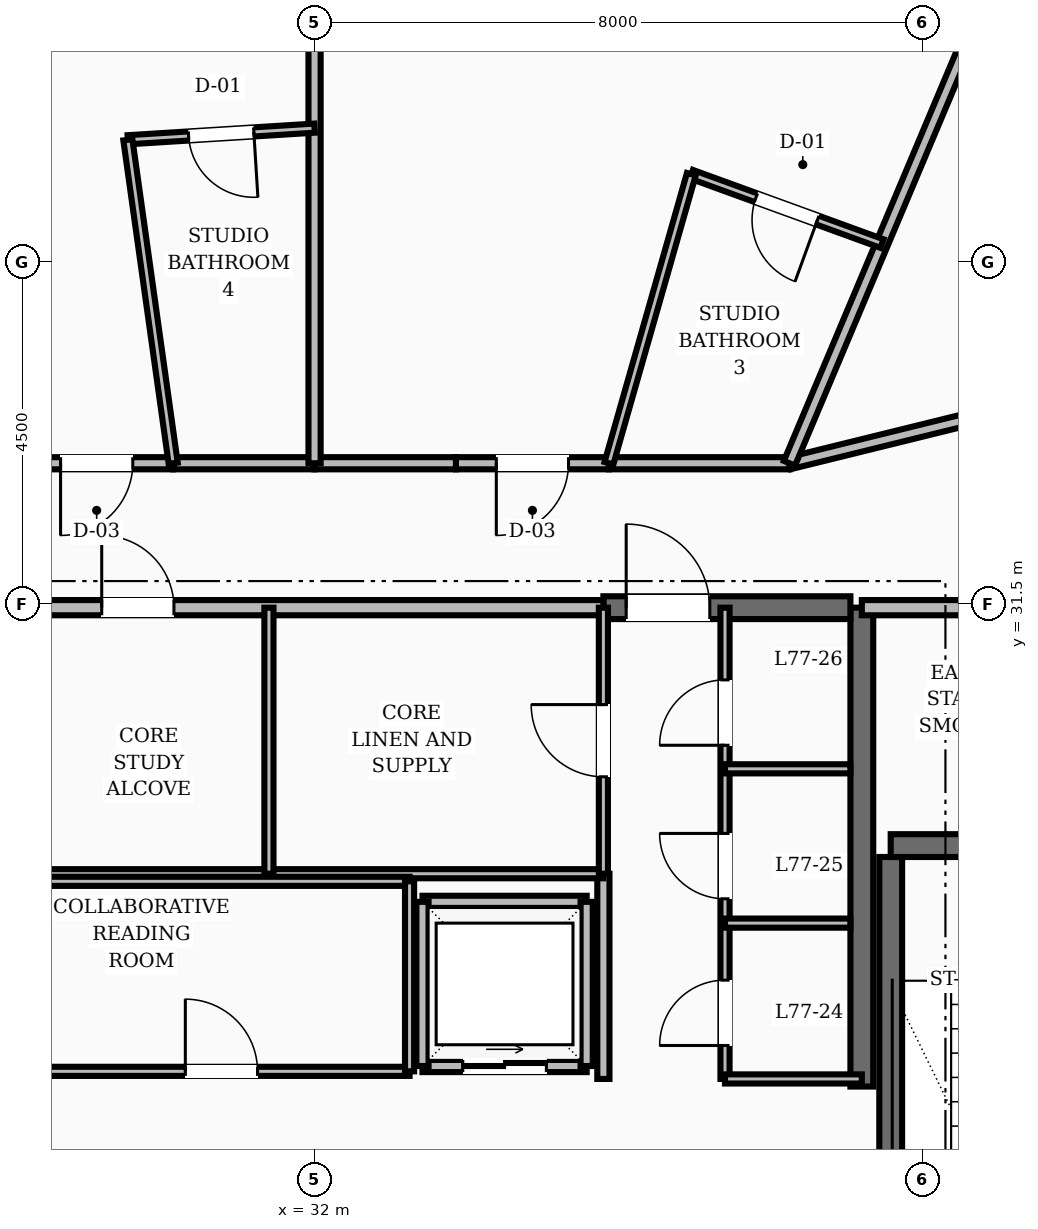
"""IFC4 building model, lengths in metres.
Left out: names, types, materials, properties, quantities, classifications, styles, units other than length and angle.
Written with IfcOpenShell. Run it as: python <this file> out.ifc"""

import sys

from ifc_helpers import new_model, si_unit, direction, frame, frame_2d, origin, place, context, subcontext, project, spatial, rectangle, extrude, element, fill, save


model = new_model("IFC4")
c1 = context("Model", 3, precision=1e-05, world=origin(), true_north=direction((0.0, 1.0)))
c2 = subcontext(c1, "Body", "Model", "MODEL_VIEW")
j1 = project(units=[si_unit("LENGTHUNIT", "METRE"), si_unit("PLANEANGLEUNIT", "RADIAN")], contexts=[c1])
p1 = place(None, origin())
s1 = spatial("IfcSite", under=j1, at=p1, CompositionType="ELEMENT")
p2 = place(p1, origin())
s2 = spatial("IfcBuilding", under=s1, at=p2, CompositionType="ELEMENT")
p3 = place(p2, frame((0.0, 0.0, 294.0)))
s3 = spatial("IfcBuildingStorey", under=s2, at=p3, CompositionType="ELEMENT", Elevation=294.0)
p4 = place(p3, frame((39.2, 25.15, 0.0), z_axis=(0.0, 0.0, 1.0), x_axis=(0.0, 1.0, 0.0)))
e1 = element("IfcWall", 1, at=p4, inside=s3, PredefinedType="SHEAR", context=c2, shape_type="SweptSolid", body=[
    extrude(rectangle(XDim=6.3, YDim=0.3, at=frame_2d((3.15, 0.0))), origin(), (0.0, 0.0, 1.0), 3.6),
])
p5 = place(p3, frame((35.8, 31.45, 0.0), z_axis=(0.0, 0.0, 1.0), x_axis=(1.0, 0.0, 0.0)))
e2 = element("IfcWall", 2, at=p5, inside=s3, PredefinedType="SHEAR", context=c2, shape_type="SweptSolid", body=[
    extrude(rectangle(XDim=3.25, YDim=0.3, at=frame_2d((1.625, 0.0))), origin(), (0.0, 0.0, 1.0), 3.6),
])
p6 = place(p5, frame((0.3, 0.0, 0.0)))
e3 = element("IfcOpeningElement", 3, at=p6, cuts=e2, PredefinedType="OPENING", context=c2, shape_type="SweptSolid", body=[
    extrude(rectangle(XDim=1.1, YDim=2.1, at=frame_2d((0.55, 1.05))), frame((0.0, 0.16, 0.0), z_axis=(0.0, -1.0, 0.0), x_axis=(1.0, 0.0, 0.0)), (0.0, 0.0, 1.0), 0.32),
])
p7 = place(p3, frame((39.58, 19.43, 0.0), z_axis=(0.0, 0.0, 1.0), x_axis=(0.0, 1.0, 0.0)))
e4 = element("IfcWall", 4, at=p7, inside=s3, PredefinedType="SHEAR", context=c2, shape_type="SweptSolid", body=[
    extrude(rectangle(XDim=8.74, YDim=0.3, at=frame_2d((4.37, 0.0))), origin(), (0.0, 0.0, 1.0), 3.6),
])
p8 = place(p3, frame((39.58, 28.32, 0.0), z_axis=(0.0, 0.0, 1.0), x_axis=(1.0, 0.0, 0.0)))
e5 = element("IfcWall", 5, at=p8, inside=s3, PredefinedType="SHEAR", context=c2, shape_type="SweptSolid", body=[
    extrude(rectangle(XDim=3.6, YDim=0.3, at=frame_2d((1.8, 0.0))), origin(), (0.0, 0.0, 1.0), 3.6),
])
p9 = place(p8, frame((1.3, 0.0, 0.0)))
e6 = element("IfcOpeningElement", 6, at=p9, cuts=e5, PredefinedType="OPENING", context=c2, shape_type="SweptSolid", body=[
    extrude(rectangle(XDim=1.1, YDim=2.1, at=frame_2d((0.55, 1.05))), frame((0.0, 0.16, 0.0), z_axis=(0.0, -1.0, 0.0), x_axis=(1.0, 0.0, 0.0)), (0.0, 0.0, 1.0), 0.32),
])
p10 = place(p3, frame((39.2, 31.45, 0.0), z_axis=(0.0, 0.0, 1.0), x_axis=(1.0, 0.0, 0.0)))
e7 = element("IfcWall", 7, at=p10, inside=s3, PredefinedType="SOLIDWALL", context=c2, shape_type="SweptSolid", body=[
    extrude(rectangle(XDim=3.98, YDim=0.2, at=frame_2d((1.99, 0.0))), origin(), (0.0, 0.0, 1.0), 2.81),
])
p11 = place(p3, frame((35.8, 25.25, 0.0), z_axis=(0.0, 0.0, 1.0), x_axis=(0.0, 1.0, 0.0)))
e8 = element("IfcWall", 8, at=p11, inside=s3, PredefinedType="SOLIDWALL", context=c2, shape_type="SweptSolid", body=[
    extrude(rectangle(XDim=2.7, YDim=0.16, at=frame_2d((1.35, 0.0))), origin(), (0.0, 0.0, 1.0), 2.81),
])
p12 = place(p3, frame((33.42, 25.42, 0.0), z_axis=(0.0, 0.0, 1.0), x_axis=(1.0, 0.0, 0.0)))
e9 = element("IfcWall", 9, at=p12, inside=s3, PredefinedType="SOLIDWALL", context=c2, shape_type="SweptSolid", body=[
    extrude(rectangle(XDim=2.16, YDim=0.16, at=frame_2d((1.08, 0.0))), origin(), (0.0, 0.0, 1.0), 2.81),
])
p13 = place(p12, frame((0.53, 0.0, 0.0)))
e10 = element("IfcOpeningElement", 10, at=p13, cuts=e9, PredefinedType="OPENING", context=c2, shape_type="SweptSolid", body=[
    extrude(rectangle(XDim=1.1, YDim=2.15, at=frame_2d((0.55, 1.075))), frame((0.0, 0.09, 0.0), z_axis=(0.0, -1.0, 0.0), x_axis=(1.0, 0.0, 0.0)), (0.0, 0.0, 1.0), 0.18),
])
for number, where, z_axis, x_axis in (
    (11, (33.42, 27.58, 0.0), (0.0, 0.0, 1.0), (1.0, 0.0, 0.0)),
    (12, (33.42, 25.42, 0.0), (0.0, 0.0, 1.0), (0.0, 1.0, 0.0)),
    (13, (35.58, 25.42, 0.0), (0.0, 0.0, 1.0), (0.0, 1.0, 0.0)),
):
    element("IfcWall", number, at=place(p3, frame(where, z_axis=z_axis, x_axis=x_axis)), inside=s3, PredefinedType="SOLIDWALL", context=c2, shape_type="SweptSolid", body=[
        extrude(rectangle(XDim=2.16, YDim=0.16, at=frame_2d((1.08, 0.0))), origin(), (0.0, 0.0, 1.0), 2.81),
    ])
p14 = place(p3, frame((28.2, 31.45, 0.0), z_axis=(0.0, 0.0, 1.0), x_axis=(1.0, 0.0, 0.0)))
e14 = element("IfcWall", 14, at=p14, inside=s3, PredefinedType="SOLIDWALL", context=c2, shape_type="SweptSolid", body=[
    extrude(rectangle(XDim=7.6, YDim=0.2, at=frame_2d((3.8, 0.0))), origin(), (0.0, 0.0, 1.0), 2.81),
])
p15 = place(p14, frame((1.0, 0.0, 0.0)))
e15 = element("IfcOpeningElement", 15, at=p15, cuts=e14, PredefinedType="OPENING", context=c2, shape_type="SweptSolid", body=[
    extrude(rectangle(XDim=0.95, YDim=2.1, at=frame_2d((0.475, 1.05))), frame((0.0, 0.11, 0.0), z_axis=(0.0, -1.0, 0.0), x_axis=(1.0, 0.0, 0.0)), (0.0, 0.0, 1.0), 0.22),
])
p16 = place(p3, frame((28.2, 27.95, 0.0), z_axis=(0.0, 0.0, 1.0), x_axis=(1.0, 0.0, 0.0)))
e16 = element("IfcWall", 16, at=p16, inside=s3, PredefinedType="PARTITIONING", context=c2, shape_type="SweptSolid", body=[
    extrude(rectangle(XDim=7.6, YDim=0.12, at=frame_2d((3.8, 0.0))), origin(), (0.0, 0.0, 1.0), 2.81),
])
p17 = place(p3, frame((35.8, 27.95, 0.0), z_axis=(0.0, 0.0, 1.0), x_axis=(0.0, 1.0, 0.0)))
e17 = element("IfcWall", 17, at=p17, inside=s3, PredefinedType="PARTITIONING", context=c2, shape_type="SweptSolid", body=[
    extrude(rectangle(XDim=3.5, YDim=0.12, at=frame_2d((1.75, 0.0))), origin(), (0.0, 0.0, 1.0), 2.81),
])
p18 = place(p17, frame((1.275, 0.0, 0.0)))
e18 = element("IfcOpeningElement", 18, at=p18, cuts=e17, PredefinedType="OPENING", context=c2, shape_type="SweptSolid", body=[
    extrude(rectangle(XDim=0.95, YDim=2.1, at=frame_2d((0.475, 1.05))), frame((0.0, 0.07, 0.0), z_axis=(0.0, -1.0, 0.0), x_axis=(1.0, 0.0, 0.0)), (0.0, 0.0, 1.0), 0.14),
])
p19 = place(p3, frame((31.4, 27.95, 0.0), z_axis=(0.0, 0.0, 1.0), x_axis=(0.0, 1.0, 0.0)))
e19 = element("IfcWall", 19, at=p19, inside=s3, PredefinedType="PARTITIONING", context=c2, shape_type="SweptSolid", body=[
    extrude(rectangle(XDim=3.5, YDim=0.12, at=frame_2d((1.75, 0.0))), origin(), (0.0, 0.0, 1.0), 2.81),
])
p20 = place(p3, frame((28.3, 25.35, 0.0), z_axis=(0.0, 0.0, 1.0), x_axis=(1.0, 0.0, 0.0)))
e20 = element("IfcWall", 20, at=p20, inside=s3, PredefinedType="PARTITIONING", context=c2, shape_type="SweptSolid", body=[
    extrude(rectangle(XDim=4.95, YDim=0.12, at=frame_2d((2.475, 0.0))), origin(), (0.0, 0.0, 1.0), 2.81),
])
p21 = place(p20, frame((2.0, 0.0, 0.0)))
e21 = element("IfcOpeningElement", 21, at=p21, cuts=e20, PredefinedType="OPENING", context=c2, shape_type="SweptSolid", body=[
    extrude(rectangle(XDim=0.95, YDim=2.1, at=frame_2d((0.475, 1.05))), frame((0.0, 0.07, 0.0), z_axis=(0.0, -1.0, 0.0), x_axis=(1.0, 0.0, 0.0)), (0.0, 0.0, 1.0), 0.14),
])
p22 = place(p3, frame((28.3, 27.85, 0.0), z_axis=(0.0, 0.0, 1.0), x_axis=(1.0, 0.0, 0.0)))
e22 = element("IfcWall", 22, at=p22, inside=s3, PredefinedType="PARTITIONING", context=c2, shape_type="SweptSolid", body=[
    extrude(rectangle(XDim=4.95, YDim=0.12, at=frame_2d((2.475, 0.0))), origin(), (0.0, 0.0, 1.0), 2.81),
])
p23 = place(p3, frame((33.25, 25.35, 0.0), z_axis=(0.0, 0.0, 1.0), x_axis=(0.0, 1.0, 0.0)))
e23 = element("IfcWall", 23, at=p23, inside=s3, PredefinedType="PARTITIONING", context=c2, shape_type="SweptSolid", body=[
    extrude(rectangle(XDim=2.5, YDim=0.12, at=frame_2d((1.25, 0.0))), origin(), (0.0, 0.0, 1.0), 2.81),
])
p24 = place(p3, frame((37.4, 25.25, 0.0), z_axis=(0.0, 0.0, 1.0), x_axis=(0.0, 1.0, 0.0)))
e24 = element("IfcWall", 24, at=p24, inside=s3, PredefinedType="PARTITIONING", context=c2, shape_type="SweptSolid", body=[
    extrude(rectangle(XDim=6.2, YDim=0.12, at=frame_2d((3.1, 0.0))), origin(), (0.0, 0.0, 1.0), 2.81),
])
p25 = place(p24, frame((0.44, 0.0, 0.0)))
e25 = element("IfcOpeningElement", 25, at=p25, cuts=e24, PredefinedType="OPENING", context=c2, shape_type="SweptSolid", body=[
    extrude(rectangle(XDim=0.86, YDim=2.1, at=frame_2d((0.43, 1.05))), frame((0.0, 0.07, 0.0), z_axis=(0.0, -1.0, 0.0), x_axis=(1.0, 0.0, 0.0)), (0.0, 0.0, 1.0), 0.14),
])
p26 = place(p24, frame((2.37, 0.0, 0.0)))
e26 = element("IfcOpeningElement", 26, at=p26, cuts=e24, PredefinedType="OPENING", context=c2, shape_type="SweptSolid", body=[
    extrude(rectangle(XDim=0.86, YDim=2.1, at=frame_2d((0.43, 1.05))), frame((0.0, 0.07, 0.0), z_axis=(0.0, -1.0, 0.0), x_axis=(1.0, 0.0, 0.0)), (0.0, 0.0, 1.0), 0.14),
])
p27 = place(p24, frame((4.39, 0.0, 0.0)))
e27 = element("IfcOpeningElement", 27, at=p27, cuts=e24, PredefinedType="OPENING", context=c2, shape_type="SweptSolid", body=[
    extrude(rectangle(XDim=0.86, YDim=2.1, at=frame_2d((0.43, 1.05))), frame((0.0, 0.07, 0.0), z_axis=(0.0, -1.0, 0.0), x_axis=(1.0, 0.0, 0.0)), (0.0, 0.0, 1.0), 0.14),
])
p28 = place(p3, frame((37.4, 25.25, 0.0), z_axis=(0.0, 0.0, 1.0), x_axis=(1.0, 0.0, 0.0)))
e28 = element("IfcWall", 28, at=p28, inside=s3, PredefinedType="PARTITIONING", context=c2, shape_type="SweptSolid", body=[
    extrude(rectangle(XDim=1.8, YDim=0.12, at=frame_2d((0.9, 0.0))), origin(), (0.0, 0.0, 1.0), 2.81),
])
for number, where, z_axis, x_axis in (
    (29, (37.4, 27.3, 0.0), (0.0, 0.0, 1.0), (1.0, 0.0, 0.0)),
    (30, (37.4, 29.33, 0.0), (0.0, 0.0, 1.0), (1.0, 0.0, 0.0)),
):
    element("IfcWall", number, at=place(p3, frame(where, z_axis=z_axis, x_axis=x_axis)), inside=s3, PredefinedType="PARTITIONING", context=c2, shape_type="SweptSolid", body=[
        extrude(rectangle(XDim=1.65, YDim=0.12, at=frame_2d((0.825, 0.0))), origin(), (0.0, 0.0, 1.0), 2.81),
    ])
p29 = place(p3, frame((42.365, 34.365, 0.0), z_axis=(0.0, 0.0, 1.0), x_axis=(-0.970939799552, -0.239323850978, 0.0)))
e31 = element("IfcWall", 31, at=p29, inside=s3, PredefinedType="SOLIDWALL", context=c2, shape_type="SweptSolid", body=[
    extrude(rectangle(XDim=4.241, YDim=0.16, at=frame_2d((2.12, 0.0))), origin(), (0.0, 0.0, 1.0), 2.81),
])
p30 = place(p3, frame((38.248, 33.35, 0.0), z_axis=(0.0, 0.0, 1.0), x_axis=(-1.0, 0.0, 0.0)))
e32 = element("IfcWall", 32, at=p30, inside=s3, PredefinedType="SOLIDWALL", context=c2, shape_type="SweptSolid", body=[
    extrude(rectangle(XDim=2.375, YDim=0.16, at=frame_2d((1.188, 0.0))), origin(), (0.0, 0.0, 1.0), 2.81),
])
p31 = place(p3, frame((35.873, 33.35, 0.0), z_axis=(0.0, 0.0, 1.0), x_axis=(-1.0, 0.0, 0.0)))
e33 = element("IfcWall", 33, at=p31, inside=s3, PredefinedType="SOLIDWALL", context=c2, shape_type="SweptSolid", body=[
    extrude(rectangle(XDim=2.013, YDim=0.16, at=frame_2d((1.006, 0.0))), origin(), (0.0, 0.0, 1.0), 2.81),
])
p32 = place(p31, frame((0.531, 0.0, 0.0)))
e34 = element("IfcOpeningElement", 34, at=p32, cuts=e33, PredefinedType="OPENING", context=c2, shape_type="SweptSolid", body=[
    extrude(rectangle(XDim=0.95, YDim=2.1, at=frame_2d((0.475, 1.05))), frame((0.0, 0.09, 0.0), z_axis=(0.0, -1.0, 0.0), x_axis=(1.0, 0.0, 0.0)), (0.0, 0.0, 1.0), 0.18),
])
for number, where, z_axis, x_axis in (
    (35, (33.86, 33.35, 0.0), (0.0, 0.0, 1.0), (-1.0, 0.0, 0.0)),
    (36, (32.0, 33.35, 0.0), (0.0, 0.0, 1.0), (-1.0, 0.0, 0.0)),
):
    element("IfcWall", number, at=place(p3, frame(where, z_axis=z_axis, x_axis=x_axis)), inside=s3, PredefinedType="SOLIDWALL", context=c2, shape_type="SweptSolid", body=[
        extrude(rectangle(XDim=1.86, YDim=0.16, at=frame_2d((0.93, 0.0))), origin(), (0.0, 0.0, 1.0), 2.81),
    ])
p33 = place(p3, frame((30.14, 33.35, 0.0), z_axis=(0.0, 0.0, 1.0), x_axis=(-1.0, 0.0, 0.0)))
e37 = element("IfcWall", 37, at=p33, inside=s3, PredefinedType="SOLIDWALL", context=c2, shape_type="SweptSolid", body=[
    extrude(rectangle(XDim=2.013, YDim=0.16, at=frame_2d((1.006, 0.0))), origin(), (0.0, 0.0, 1.0), 2.81),
])
p34 = place(p33, frame((0.531, 0.0, 0.0)))
e38 = element("IfcOpeningElement", 38, at=p34, cuts=e37, PredefinedType="OPENING", context=c2, shape_type="SweptSolid", body=[
    extrude(rectangle(XDim=0.95, YDim=2.1, at=frame_2d((0.475, 1.05))), frame((0.0, 0.09, 0.0), z_axis=(0.0, -1.0, 0.0), x_axis=(1.0, 0.0, 0.0)), (0.0, 0.0, 1.0), 0.18),
])
p35 = place(p3, frame((38.248, 33.35, 0.0), z_axis=(0.0, 0.0, 1.0), x_axis=(0.388445474078, 0.921471710726, 0.0)))
e39 = element("IfcWall", 39, at=p35, inside=s3, PredefinedType="SOLIDWALL", context=c2, shape_type="SweptSolid", body=[
    extrude(rectangle(XDim=8.203, YDim=0.16, at=frame_2d((4.102, 0.0))), origin(), (0.0, 0.0, 1.0), 2.81),
])
p36 = place(p3, frame((39.466, 36.24, 0.0), z_axis=(0.0, 0.0, 1.0), x_axis=(-0.939756036214, 0.341845860585, 0.0)))
e40 = element("IfcWall", 40, at=p36, inside=s3, PredefinedType="PARTITIONING", context=c2, shape_type="SweptSolid", body=[
    extrude(rectangle(XDim=2.67, YDim=0.12, at=frame_2d((1.335, 0.0))), origin(), (0.0, 0.0, 1.0), 2.81),
])
p37 = place(p36, frame((0.905, 0.0, 0.0)))
e41 = element("IfcOpeningElement", 41, at=p37, cuts=e40, PredefinedType="OPENING", context=c2, shape_type="SweptSolid", body=[
    extrude(rectangle(XDim=0.86, YDim=2.1, at=frame_2d((0.43, 1.05))), frame((0.0, 0.07, 0.0), z_axis=(0.0, -1.0, 0.0), x_axis=(1.0, 0.0, 0.0)), (0.0, 0.0, 1.0), 0.14),
])
p38 = place(p3, frame((35.873, 33.35, 0.0), z_axis=(0.0, 0.0, 1.0), x_axis=(0.274207327835, 0.961670599198, 0.0)))
e42 = element("IfcWall", 42, at=p38, inside=s3, PredefinedType="PARTITIONING", context=c2, shape_type="SweptSolid", body=[
    extrude(rectangle(XDim=3.954, YDim=0.12, at=frame_2d((1.977, 0.0))), origin(), (0.0, 0.0, 1.0), 2.81),
])
p39 = place(p3, frame((32.0, 33.35, 0.0), z_axis=(0.0, 0.0, 1.0), x_axis=(0.0, 1.0, 0.0)))
e43 = element("IfcWall", 43, at=p39, inside=s3, PredefinedType="SOLIDWALL", context=c2, shape_type="SweptSolid", body=[
    extrude(rectangle(XDim=11.552, YDim=0.16, at=frame_2d((5.776, 0.0))), origin(), (0.0, 0.0, 1.0), 2.81),
])
p40 = place(p3, frame((32.0, 37.759, 0.0), z_axis=(0.0, 0.0, 1.0), x_axis=(-0.998063372487, -0.062205341407, 0.0)))
e44 = element("IfcWall", 44, at=p40, inside=s3, PredefinedType="PARTITIONING", context=c2, shape_type="SweptSolid", body=[
    extrude(rectangle(XDim=2.461, YDim=0.12, at=frame_2d((1.23, 0.0))), origin(), (0.0, 0.0, 1.0), 2.81),
])
p41 = place(p40, frame((0.801, 0.0, 0.0)))
e45 = element("IfcOpeningElement", 45, at=p41, cuts=e44, PredefinedType="OPENING", context=c2, shape_type="SweptSolid", body=[
    extrude(rectangle(XDim=0.86, YDim=2.1, at=frame_2d((0.43, 1.05))), frame((0.0, 0.07, 0.0), z_axis=(0.0, -1.0, 0.0), x_axis=(1.0, 0.0, 0.0)), (0.0, 0.0, 1.0), 0.14),
])
p42 = place(p3, frame((30.14, 33.35, 0.0), z_axis=(0.0, 0.0, 1.0), x_axis=(-0.138740342573, 0.990328792545, 0.0)))
e46 = element("IfcWall", 46, at=p42, inside=s3, PredefinedType="PARTITIONING", context=c2, shape_type="SweptSolid", body=[
    extrude(rectangle(XDim=4.297, YDim=0.12, at=frame_2d((2.148, 0.0))), origin(), (0.0, 0.0, 1.0), 2.81),
])
p43 = place(p6, origin())
e47 = element("IfcDoor", 47, at=p43, inside=s3, OperationType="SINGLE_SWING_LEFT", PredefinedType="DOOR", context=c2, shape_type="SweptSolid", body=[
    extrude(rectangle(XDim=1.1, YDim=2.1, at=frame_2d((0.55, 1.05))), frame((0.0, 0.025, 0.0), z_axis=(0.0, -1.0, 0.0), x_axis=(1.0, 0.0, 0.0)), (0.0, 0.0, 1.0), 0.05),
])
fill(e3, e47)
p44 = place(p13, origin())
e48 = element("IfcDoor", 48, at=p44, inside=s3, OperationType="SLIDING_TO_RIGHT", PredefinedType="DOOR", context=c2, shape_type="SweptSolid", body=[
    extrude(rectangle(XDim=1.1, YDim=2.15, at=frame_2d((0.55, 1.075))), frame((0.0, 0.025, 0.0), z_axis=(0.0, -1.0, 0.0), x_axis=(1.0, 0.0, 0.0)), (0.0, 0.0, 1.0), 0.05),
])
fill(e10, e48)
p45 = place(p15, origin())
e49 = element("IfcDoor", 49, at=p45, inside=s3, OperationType="SINGLE_SWING_LEFT", PredefinedType="DOOR", context=c2, shape_type="SweptSolid", body=[
    extrude(rectangle(XDim=0.95, YDim=2.1, at=frame_2d((0.475, 1.05))), frame((0.0, 0.025, 0.0), z_axis=(0.0, -1.0, 0.0), x_axis=(1.0, 0.0, 0.0)), (0.0, 0.0, 1.0), 0.05),
])
fill(e15, e49)
p46 = place(p18, origin())
e50 = element("IfcDoor", 50, at=p46, inside=s3, OperationType="SINGLE_SWING_RIGHT", PredefinedType="DOOR", context=c2, shape_type="SweptSolid", body=[
    extrude(rectangle(XDim=0.95, YDim=2.1, at=frame_2d((0.475, 1.05))), frame((0.0, 0.025, 0.0), z_axis=(0.0, -1.0, 0.0), x_axis=(1.0, 0.0, 0.0)), (0.0, 0.0, 1.0), 0.05),
])
fill(e18, e50)
p47 = place(p21, origin())
e51 = element("IfcDoor", 51, at=p47, inside=s3, OperationType="SINGLE_SWING_LEFT", PredefinedType="DOOR", context=c2, shape_type="SweptSolid", body=[
    extrude(rectangle(XDim=0.95, YDim=2.1, at=frame_2d((0.475, 1.05))), frame((0.0, 0.025, 0.0), z_axis=(0.0, -1.0, 0.0), x_axis=(1.0, 0.0, 0.0)), (0.0, 0.0, 1.0), 0.05),
])
fill(e21, e51)
p48 = place(p25, origin())
e52 = element("IfcDoor", 52, at=p48, inside=s3, OperationType="SINGLE_SWING_LEFT", PredefinedType="DOOR", context=c2, shape_type="SweptSolid", body=[
    extrude(rectangle(XDim=0.86, YDim=2.1, at=frame_2d((0.43, 1.05))), frame((0.0, 0.025, 0.0), z_axis=(0.0, -1.0, 0.0), x_axis=(1.0, 0.0, 0.0)), (0.0, 0.0, 1.0), 0.05),
])
fill(e25, e52)
p49 = place(p26, origin())
e53 = element("IfcDoor", 53, at=p49, inside=s3, OperationType="SINGLE_SWING_RIGHT", PredefinedType="DOOR", context=c2, shape_type="SweptSolid", body=[
    extrude(rectangle(XDim=0.86, YDim=2.1, at=frame_2d((0.43, 1.05))), frame((0.0, 0.025, 0.0), z_axis=(0.0, -1.0, 0.0), x_axis=(1.0, 0.0, 0.0)), (0.0, 0.0, 1.0), 0.05),
])
fill(e26, e53)
p50 = place(p27, origin())
e54 = element("IfcDoor", 54, at=p50, inside=s3, OperationType="SINGLE_SWING_LEFT", PredefinedType="DOOR", context=c2, shape_type="SweptSolid", body=[
    extrude(rectangle(XDim=0.86, YDim=2.1, at=frame_2d((0.43, 1.05))), frame((0.0, 0.025, 0.0), z_axis=(0.0, -1.0, 0.0), x_axis=(1.0, 0.0, 0.0)), (0.0, 0.0, 1.0), 0.05),
])
fill(e27, e54)
p51 = place(p37, origin())
e55 = element("IfcDoor", 55, at=p51, inside=s3, OperationType="SINGLE_SWING_LEFT", PredefinedType="DOOR", context=c2, shape_type="SweptSolid", body=[
    extrude(rectangle(XDim=0.86, YDim=2.1, at=frame_2d((0.43, 1.05))), frame((0.0, 0.025, 0.0), z_axis=(0.0, -1.0, 0.0), x_axis=(1.0, 0.0, 0.0)), (0.0, 0.0, 1.0), 0.05),
])
fill(e41, e55)
p52 = place(p32, origin())
e56 = element("IfcDoor", 56, at=p52, inside=s3, OperationType="SINGLE_SWING_RIGHT", PredefinedType="DOOR", context=c2, shape_type="SweptSolid", body=[
    extrude(rectangle(XDim=0.95, YDim=2.1, at=frame_2d((0.475, 1.05))), frame((0.0, 0.025, 0.0), z_axis=(0.0, -1.0, 0.0), x_axis=(1.0, 0.0, 0.0)), (0.0, 0.0, 1.0), 0.05),
])
fill(e34, e56)
p53 = place(p41, origin())
e57 = element("IfcDoor", 57, at=p53, inside=s3, OperationType="SINGLE_SWING_LEFT", PredefinedType="DOOR", context=c2, shape_type="SweptSolid", body=[
    extrude(rectangle(XDim=0.86, YDim=2.1, at=frame_2d((0.43, 1.05))), frame((0.0, 0.025, 0.0), z_axis=(0.0, -1.0, 0.0), x_axis=(1.0, 0.0, 0.0)), (0.0, 0.0, 1.0), 0.05),
])
fill(e45, e57)
p54 = place(p34, origin())
e58 = element("IfcDoor", 58, at=p54, inside=s3, OperationType="SINGLE_SWING_RIGHT", PredefinedType="DOOR", context=c2, shape_type="SweptSolid", body=[
    extrude(rectangle(XDim=0.95, YDim=2.1, at=frame_2d((0.475, 1.05))), frame((0.0, 0.025, 0.0), z_axis=(0.0, -1.0, 0.0), x_axis=(1.0, 0.0, 0.0)), (0.0, 0.0, 1.0), 0.05),
])
fill(e38, e58)
save(model, sys.argv[1])
